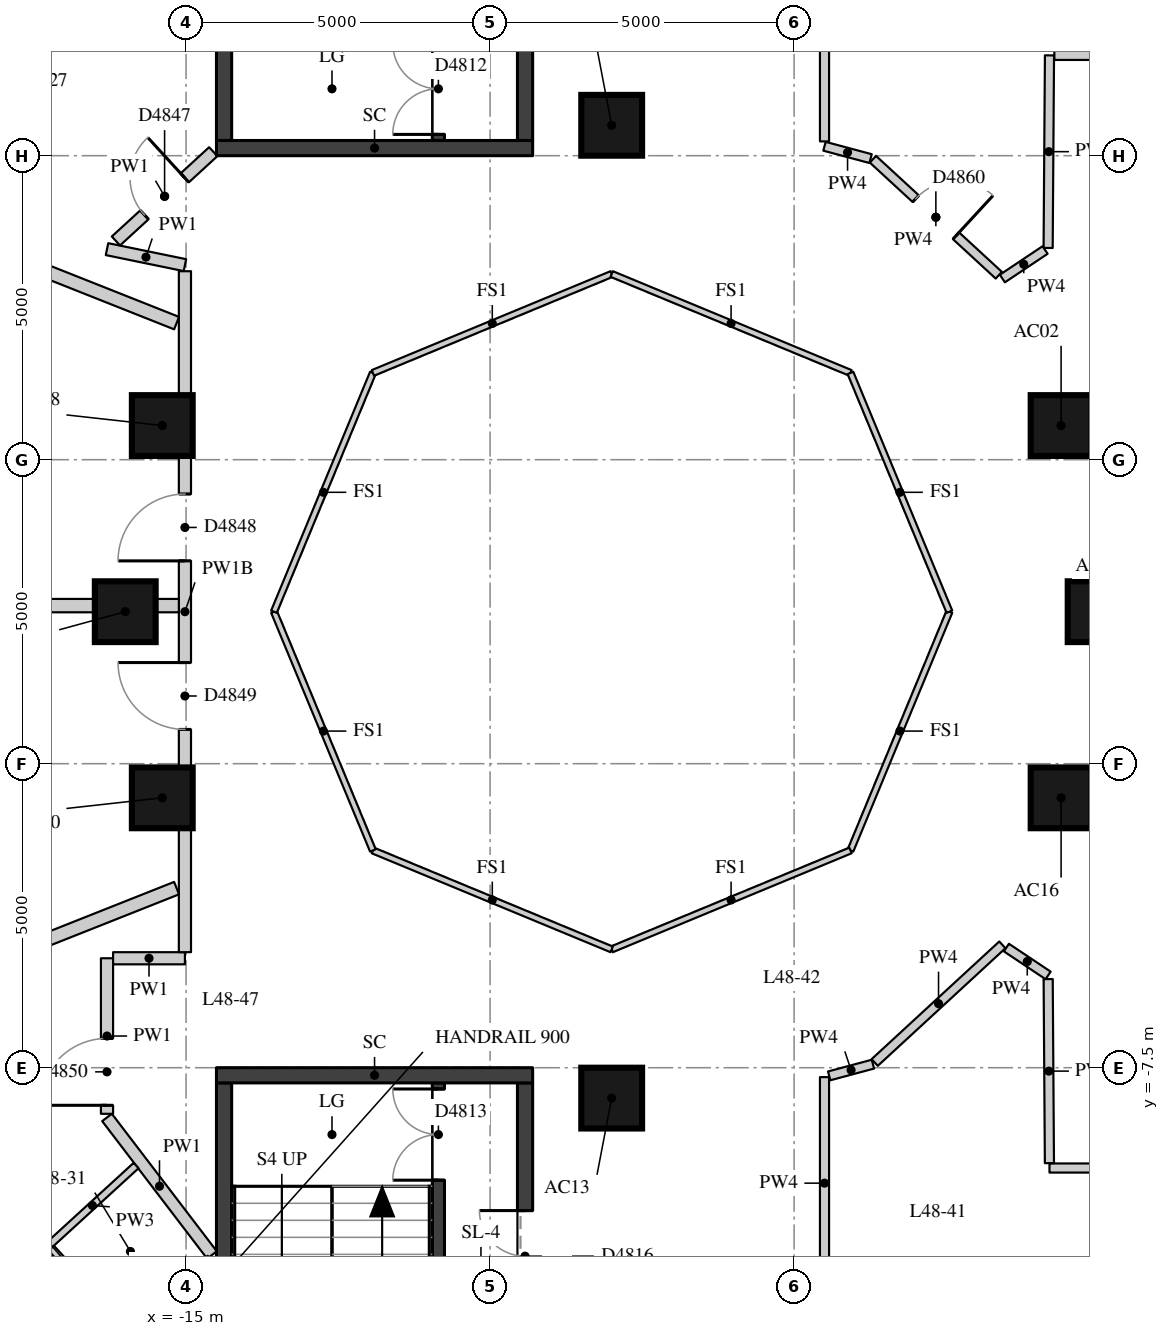
"""IFC4 building model, lengths in metres.
Left out: names, types, materials, properties, quantities, classifications, styles, units other than length and angle.
Written with IfcOpenShell. Run it as: python <this file> out.ifc"""

import sys

from ifc_helpers import new_model, si_unit, direction, frame, frame_2d, origin, origin_2d, place, context, subcontext, project, spatial, rectangle, extrude, element, fill, save


model = new_model("IFC4")
c1 = context("Model", 3, precision=1e-05, world=origin(), true_north=direction((0.0, 1.0)))
c2 = subcontext(c1, "Body", "Model", "MODEL_VIEW")
j1 = project(units=[si_unit("LENGTHUNIT", "METRE"), si_unit("PLANEANGLEUNIT", "RADIAN")], contexts=[c1])
p1 = place(None, origin())
s1 = spatial("IfcSite", under=j1, at=p1, CompositionType="ELEMENT")
p2 = place(p1, origin())
s2 = spatial("IfcBuilding", under=s1, at=p2, CompositionType="ELEMENT")
p3 = place(p2, frame((0.0, 0.0, 171.5)))
s3 = spatial("IfcBuildingStorey", under=s2, at=p3, CompositionType="ELEMENT", Elevation=171.5)
for number, where, z_axis, x_axis in (
    (1, (0.0, 0.0, 0.0), (0.0, 0.0, 1.0), (1.0, 0.0, 0.0)),
    (2, (-0.609, 3.062, 0.0), (0.0, 0.0, 1.0), (1.0, 0.0, 0.0)),
    (3, (-8.0, 8.0, 0.0), (0.0, 0.0, 1.0), (1.0, 0.0, 0.0)),
    (4, (-15.391, 3.062, 0.0), (0.0, 0.0, 1.0), (1.0, 0.0, 0.0)),
    (5, (-16.0, 0.0, 0.0), (0.0, 0.0, 1.0), (1.0, 0.0, 0.0)),
    (6, (-15.391, -3.062, 0.0), (0.0, 0.0, 1.0), (1.0, 0.0, 0.0)),
    (7, (-8.0, -8.0, 0.0), (0.0, 0.0, 1.0), (1.0, 0.0, 0.0)),
    (8, (-0.609, -3.062, 0.0), (0.0, 0.0, 1.0), (1.0, 0.0, 0.0)),
):
    element("IfcColumn", number, at=place(p3, frame(where, z_axis=z_axis, x_axis=x_axis)), inside=s3, PredefinedType="COLUMN", context=c2, shape_type="SweptSolid", body=[
        extrude(rectangle(XDim=1.0, YDim=1.0, at=origin_2d()), origin(), (0.0, 0.0, 1.0), 3.3),
    ])
p4 = place(p3, frame((-10.85, 7.75, 0.0), z_axis=(0.0, 0.0, 1.0), x_axis=(0.0, 1.0, 0.0)))
e9 = element("IfcWall", 9, at=p4, inside=s3, PredefinedType="SHEAR", context=c2, shape_type="SweptSolid", body=[
    extrude(rectangle(XDim=6.0, YDim=0.2, at=frame_2d((3.0, 0.0))), origin(), (0.0, 0.0, 1.0), 3.02),
])
p5 = place(p4, frame((0.1, 0.0, 0.0)))
e10 = element("IfcOpeningElement", 10, at=p5, cuts=e9, PredefinedType="OPENING", context=c2, shape_type="SweptSolid", body=[
    extrude(rectangle(XDim=1.5, YDim=2.1, at=frame_2d((0.75, 1.05))), frame((0.0, 0.11, 0.0), z_axis=(0.0, -1.0, 0.0), x_axis=(1.0, 0.0, 0.0)), (0.0, 0.0, 1.0), 0.22),
])
p6 = place(p3, frame((-10.85, -13.75, 0.0), z_axis=(0.0, 0.0, 1.0), x_axis=(0.0, 1.0, 0.0)))
e11 = element("IfcWall", 11, at=p6, inside=s3, PredefinedType="SHEAR", context=c2, shape_type="SweptSolid", body=[
    extrude(rectangle(XDim=6.0, YDim=0.2, at=frame_2d((3.0, 0.0))), origin(), (0.0, 0.0, 1.0), 3.02),
])
p7 = place(p6, frame((4.4, 0.0, 0.0)))
e12 = element("IfcOpeningElement", 12, at=p7, cuts=e11, PredefinedType="OPENING", context=c2, shape_type="SweptSolid", body=[
    extrude(rectangle(XDim=1.5, YDim=2.1, at=frame_2d((0.75, 1.05))), frame((0.0, 0.11, 0.0), z_axis=(0.0, -1.0, 0.0), x_axis=(1.0, 0.0, 0.0)), (0.0, 0.0, 1.0), 0.22),
])
p8 = place(p3, frame((-14.375, 7.75, -0.28), z_axis=(0.0, 0.0, 1.0), x_axis=(0.0, 1.0, 0.0)))
e13 = element("IfcWall", 13, at=p8, inside=s3, PredefinedType="SHEAR", context=c2, shape_type="SweptSolid", body=[
    extrude(rectangle(XDim=6.0, YDim=0.25, at=frame_2d((3.0, 0.0))), origin(), (0.0, 0.0, 1.0), 3.3),
])
p9 = place(p3, frame((-9.425, 7.75, -0.28), z_axis=(0.0, 0.0, 1.0), x_axis=(0.0, 1.0, 0.0)))
e14 = element("IfcWall", 14, at=p9, inside=s3, PredefinedType="SHEAR", context=c2, shape_type="SweptSolid", body=[
    extrude(rectangle(XDim=6.0, YDim=0.25, at=frame_2d((3.0, 0.0))), origin(), (0.0, 0.0, 1.0), 3.3),
])
p10 = place(p9, frame((2.1, 0.0, 0.28)))
e15 = element("IfcOpeningElement", 15, at=p10, cuts=e14, PredefinedType="OPENING", context=c2, shape_type="SweptSolid", body=[
    extrude(rectangle(XDim=1.5, YDim=2.1, at=frame_2d((0.75, 1.05))), frame((0.0, 0.135, 0.0), z_axis=(0.0, -1.0, 0.0), x_axis=(1.0, 0.0, 0.0)), (0.0, 0.0, 1.0), 0.27),
])
p11 = place(p3, frame((-14.5, 7.625, -0.28), z_axis=(0.0, 0.0, 1.0), x_axis=(1.0, 0.0, 0.0)))
e16 = element("IfcWall", 16, at=p11, inside=s3, PredefinedType="SHEAR", context=c2, shape_type="SweptSolid", body=[
    extrude(rectangle(XDim=5.2, YDim=0.25, at=frame_2d((2.6, 0.0))), origin(), (0.0, 0.0, 1.0), 3.3),
])
p12 = place(p3, frame((-14.375, -13.75, -0.28), z_axis=(0.0, 0.0, 1.0), x_axis=(0.0, 1.0, 0.0)))
e17 = element("IfcWall", 17, at=p12, inside=s3, PredefinedType="SHEAR", context=c2, shape_type="SweptSolid", body=[
    extrude(rectangle(XDim=6.0, YDim=0.25, at=frame_2d((3.0, 0.0))), origin(), (0.0, 0.0, 1.0), 3.3),
])
p13 = place(p3, frame((-9.425, -13.75, -0.28), z_axis=(0.0, 0.0, 1.0), x_axis=(0.0, 1.0, 0.0)))
e18 = element("IfcWall", 18, at=p13, inside=s3, PredefinedType="SHEAR", context=c2, shape_type="SweptSolid", body=[
    extrude(rectangle(XDim=6.0, YDim=0.25, at=frame_2d((3.0, 0.0))), origin(), (0.0, 0.0, 1.0), 3.3),
])
p14 = place(p13, frame((2.4, 0.0, 0.28)))
e19 = element("IfcOpeningElement", 19, at=p14, cuts=e18, PredefinedType="OPENING", context=c2, shape_type="SweptSolid", body=[
    extrude(rectangle(XDim=1.5, YDim=2.1, at=frame_2d((0.75, 1.05))), frame((0.0, 0.135, 0.0), z_axis=(0.0, -1.0, 0.0), x_axis=(1.0, 0.0, 0.0)), (0.0, 0.0, 1.0), 0.27),
])
p15 = place(p3, frame((-14.5, -7.625, -0.28), z_axis=(0.0, 0.0, 1.0), x_axis=(1.0, 0.0, 0.0)))
e20 = element("IfcWall", 20, at=p15, inside=s3, PredefinedType="SHEAR", context=c2, shape_type="SweptSolid", body=[
    extrude(rectangle(XDim=5.2, YDim=0.25, at=frame_2d((2.6, 0.0))), origin(), (0.0, 0.0, 1.0), 3.3),
])
p16 = place(p3, frame((-15.019, 5.7, 0.0), z_axis=(0.0, 0.0, 1.0), x_axis=(-0.979555577822, 0.201173730785, 0.0)))
e21 = element("IfcWall", 21, at=p16, inside=s3, PredefinedType="PARTITIONING", context=c2, shape_type="SweptSolid", body=[
    extrude(rectangle(XDim=1.308, YDim=0.2, at=frame_2d((0.654, 0.0))), origin(), (0.0, 0.0, 1.0), 3.02),
])
p17 = place(p3, frame((-16.154, 6.097, 0.0), z_axis=(0.0, 0.0, 1.0), x_axis=(0.736958194284, 0.675938325498, 0.0)))
e22 = element("IfcWall", 22, at=p17, inside=s3, PredefinedType="PARTITIONING", context=c2, shape_type="SweptSolid", body=[
    extrude(rectangle(XDim=2.173, YDim=0.2, at=frame_2d((1.086, 0.0))), origin(), (0.0, 0.0, 1.0), 3.02),
])
p18 = place(p17, frame((0.636, 0.0, 0.0)))
e23 = element("IfcOpeningElement", 23, at=p18, cuts=e22, PredefinedType="OPENING", context=c2, shape_type="SweptSolid", body=[
    extrude(rectangle(XDim=0.9, YDim=2.1, at=frame_2d((0.45, 1.05))), frame((0.0, 0.11, 0.0), z_axis=(0.0, -1.0, 0.0), x_axis=(1.0, 0.0, 0.0)), (0.0, 0.0, 1.0), 0.22),
])
p19 = place(p3, frame((-14.574, -10.58, 0.0), z_axis=(0.0, 0.0, 1.0), x_axis=(-0.606733250298, 0.794905505694, 0.0)))
e24 = element("IfcWall", 24, at=p19, inside=s3, PredefinedType="PARTITIONING", context=c2, shape_type="SweptSolid", body=[
    extrude(rectangle(XDim=2.845, YDim=0.2, at=frame_2d((1.423, 0.0))), origin(), (0.0, 0.0, 1.0), 3.02),
])
p20 = place(p3, frame((-16.3, -8.258, 0.0), z_axis=(0.0, 0.0, 1.0), x_axis=(0.0, 1.0, 0.0)))
e25 = element("IfcWall", 25, at=p20, inside=s3, PredefinedType="PARTITIONING", context=c2, shape_type="SweptSolid", body=[
    extrude(rectangle(XDim=2.558, YDim=0.2, at=frame_2d((1.279, 0.0))), origin(), (0.0, 0.0, 1.0), 3.02),
])
p21 = place(p20, frame((0.14, 0.0, 0.0)))
e26 = element("IfcOpeningElement", 26, at=p21, cuts=e25, PredefinedType="OPENING", context=c2, shape_type="SweptSolid", body=[
    extrude(rectangle(XDim=1.1, YDim=2.1, at=frame_2d((0.55, 1.05))), frame((0.0, 0.11, 0.0), z_axis=(0.0, -1.0, 0.0), x_axis=(1.0, 0.0, 0.0)), (0.0, 0.0, 1.0), 0.22),
])
p22 = place(p3, frame((-16.2, -5.7, 0.0), z_axis=(0.0, 0.0, 1.0), x_axis=(1.0, 0.0, 0.0)))
e27 = element("IfcWall", 27, at=p22, inside=s3, PredefinedType="PARTITIONING", context=c2, shape_type="SweptSolid", body=[
    extrude(rectangle(XDim=1.181, YDim=0.2, at=frame_2d((0.591, 0.0))), origin(), (0.0, 0.0, 1.0), 3.02),
])
p23 = place(p3, frame((-15.019, -5.6, 0.0), z_axis=(0.0, 0.0, 1.0), x_axis=(0.0, 1.0, 0.0)))
e28 = element("IfcWall", 28, at=p23, inside=s3, PredefinedType="PARTITIONING", context=c2, shape_type="SweptSolid", body=[
    extrude(rectangle(XDim=11.2, YDim=0.2, at=frame_2d((5.6, 0.0))), origin(), (0.0, 0.0, 1.0), 2.52),
])
p24 = place(p23, frame((6.436, 0.0, 0.0)))
e29 = element("IfcOpeningElement", 29, at=p24, cuts=e28, PredefinedType="OPENING", context=c2, shape_type="SweptSolid", body=[
    extrude(rectangle(XDim=1.1, YDim=2.1, at=frame_2d((0.55, 1.05))), frame((0.0, 0.11, 0.0), z_axis=(0.0, -1.0, 0.0), x_axis=(1.0, 0.0, 0.0)), (0.0, 0.0, 1.0), 0.22),
])
p25 = place(p23, frame((3.663, 0.0, 0.0)))
e30 = element("IfcOpeningElement", 30, at=p25, cuts=e28, PredefinedType="OPENING", context=c2, shape_type="SweptSolid", body=[
    extrude(rectangle(XDim=1.1, YDim=2.1, at=frame_2d((0.55, 1.05))), frame((0.0, 0.11, 0.0), z_axis=(0.0, -1.0, 0.0), x_axis=(1.0, 0.0, 0.0)), (0.0, 0.0, 1.0), 0.22),
])
p26 = place(p3, frame((-0.8, 9.15, 0.0), z_axis=(0.0, 0.0, 1.0), x_axis=(-0.007013855529, -0.999975402613, 0.0)))
e31 = element("IfcWall", 31, at=p26, inside=s3, PredefinedType="PARTITIONING", context=c2, shape_type="SweptSolid", body=[
    extrude(rectangle(XDim=3.167, YDim=0.15, at=frame_2d((1.584, 0.0))), origin(), (0.0, 0.0, 1.0), 3.02),
])
p27 = place(p3, frame((-0.872, 5.949, 0.0), z_axis=(0.0, 0.0, 1.0), x_axis=(-0.831694574928, -0.555233405006, 0.0)))
e32 = element("IfcWall", 32, at=p27, inside=s3, PredefinedType="PARTITIONING", context=c2, shape_type="SweptSolid", body=[
    extrude(rectangle(XDim=0.845, YDim=0.15, at=frame_2d((0.423, 0.0))), origin(), (0.0, 0.0, 1.0), 3.02),
])
p28 = place(p3, frame((-1.634, 5.534, 0.0), z_axis=(0.0, 0.0, 1.0), x_axis=(-0.735398368623, 0.67763503409, 0.0)))
e33 = element("IfcWall", 33, at=p28, inside=s3, PredefinedType="PARTITIONING", context=c2, shape_type="SweptSolid", body=[
    extrude(rectangle(XDim=2.815, YDim=0.15, at=frame_2d((1.407, 0.0))), origin(), (0.0, 0.0, 1.0), 3.02),
])
p29 = place(p28, frame((0.958, 0.0, 0.0)))
e34 = element("IfcOpeningElement", 34, at=p29, cuts=e33, PredefinedType="OPENING", context=c2, shape_type="SweptSolid", body=[
    extrude(rectangle(XDim=0.9, YDim=2.1, at=frame_2d((0.45, 1.05))), frame((0.0, 0.085, 0.0), z_axis=(0.0, -1.0, 0.0), x_axis=(1.0, 0.0, 0.0)), (0.0, 0.0, 1.0), 0.17),
])
p30 = place(p3, frame((-3.742, 7.452, 0.0), z_axis=(0.0, 0.0, 1.0), x_axis=(-0.965903596155, 0.258901994846, 0.0)))
e35 = element("IfcWall", 35, at=p30, inside=s3, PredefinedType="PARTITIONING", context=c2, shape_type="SweptSolid", body=[
    extrude(rectangle(XDim=0.785, YDim=0.15, at=frame_2d((0.392, 0.0))), origin(), (0.0, 0.0, 1.0), 3.02),
])
p31 = place(p3, frame((-4.5, 7.735, 0.0), z_axis=(0.0, 0.0, 1.0), x_axis=(0.0, 1.0, 0.0)))
e36 = element("IfcWall", 36, at=p31, inside=s3, PredefinedType="PARTITIONING", context=c2, shape_type="SweptSolid", body=[
    extrude(rectangle(XDim=3.848, YDim=0.15, at=frame_2d((1.924, 0.0))), origin(), (0.0, 0.0, 1.0), 3.02),
])
p32 = place(p3, frame((1.32, 9.15, 0.0), z_axis=(0.0, 0.0, 1.0), x_axis=(-1.0, 0.0, 0.0)))
e37 = element("IfcWall", 37, at=p32, inside=s3, PredefinedType="PARTITIONING", context=c2, shape_type="SweptSolid", body=[
    extrude(rectangle(XDim=2.04, YDim=0.15, at=frame_2d((1.02, 0.0))), origin(), (0.0, 0.0, 1.0), 3.02),
])
p33 = place(p3, frame((-0.8, -9.15, 0.0), z_axis=(0.0, 0.0, 1.0), x_axis=(1.0, 0.0, 0.0)))
e38 = element("IfcWall", 38, at=p33, inside=s3, PredefinedType="PARTITIONING", context=c2, shape_type="SweptSolid", body=[
    extrude(rectangle(XDim=2.2, YDim=0.15, at=frame_2d((1.1, 0.0))), origin(), (0.0, 0.0, 1.0), 3.02),
])
p34 = place(p3, frame((-4.5, -11.143, 0.0), z_axis=(0.0, 0.0, 1.0), x_axis=(0.0, 1.0, 0.0)))
e39 = element("IfcWall", 39, at=p34, inside=s3, PredefinedType="PARTITIONING", context=c2, shape_type="SweptSolid", body=[
    extrude(rectangle(XDim=3.488, YDim=0.15, at=frame_2d((1.744, 0.0))), origin(), (0.0, 0.0, 1.0), 3.02),
])
p35 = place(p3, frame((-4.423, -7.635, 0.0), z_axis=(0.0, 0.0, 1.0), x_axis=(0.965874851679, 0.259009210056, 0.0)))
e40 = element("IfcWall", 40, at=p35, inside=s3, PredefinedType="PARTITIONING", context=c2, shape_type="SweptSolid", body=[
    extrude(rectangle(XDim=0.745, YDim=0.15, at=frame_2d((0.372, 0.0))), origin(), (0.0, 0.0, 1.0), 3.02),
])
p36 = place(p3, frame((-3.674, -7.414, 0.0), z_axis=(0.0, 0.0, 1.0), x_axis=(0.735337612747, 0.677700963021, 0.0)))
e41 = element("IfcWall", 41, at=p36, inside=s3, PredefinedType="PARTITIONING", context=c2, shape_type="SweptSolid", body=[
    extrude(rectangle(XDim=2.855, YDim=0.15, at=frame_2d((1.427, 0.0))), origin(), (0.0, 0.0, 1.0), 3.02),
])
p37 = place(p3, frame((-1.509, -5.524, 0.0), z_axis=(0.0, 0.0, 1.0), x_axis=(0.831777054297, -0.555109837731, 0.0)))
e42 = element("IfcWall", 42, at=p37, inside=s3, PredefinedType="PARTITIONING", context=c2, shape_type="SweptSolid", body=[
    extrude(rectangle(XDim=0.825, YDim=0.15, at=frame_2d((0.413, 0.0))), origin(), (0.0, 0.0, 1.0), 3.02),
])
p38 = place(p3, frame((-0.822, -6.042, 0.0), z_axis=(0.0, 0.0, 1.0), x_axis=(0.006774038121, -0.999977055941, 0.0)))
e43 = element("IfcWall", 43, at=p38, inside=s3, PredefinedType="PARTITIONING", context=c2, shape_type="SweptSolid", body=[
    extrude(rectangle(XDim=3.027, YDim=0.15, at=frame_2d((1.514, 0.0))), origin(), (0.0, 0.0, 1.0), 3.02),
])
p39 = place(p3, frame((-21.239, 7.16, 0.0), z_axis=(0.0, 0.0, 1.0), x_axis=(0.929520145478, -0.368771337215, 0.0)))
e44 = element("IfcWall", 44, at=p39, inside=s3, PredefinedType="PARTITIONING", context=c2, shape_type="SweptSolid", body=[
    extrude(rectangle(XDim=6.544, YDim=0.22, at=frame_2d((3.272, 0.0))), origin(), (0.0, 0.0, 1.0), 3.02),
])
p40 = place(p3, frame((-22.6, 0.1, 0.0), z_axis=(0.0, 0.0, 1.0), x_axis=(1.0, 0.0, 0.0)))
e45 = element("IfcWall", 45, at=p40, inside=s3, PredefinedType="PARTITIONING", context=c2, shape_type="SweptSolid", body=[
    extrude(rectangle(XDim=7.481, YDim=0.22, at=frame_2d((3.741, 0.0))), origin(), (0.0, 0.0, 1.0), 2.57),
])
p41 = place(p3, frame((-21.239, -6.96, 0.0), z_axis=(0.0, 0.0, 1.0), x_axis=(0.929520145478, 0.368771337215, 0.0)))
e46 = element("IfcWall", 46, at=p41, inside=s3, PredefinedType="PARTITIONING", context=c2, shape_type="SweptSolid", body=[
    extrude(rectangle(XDim=6.544, YDim=0.22, at=frame_2d((3.272, 0.0))), origin(), (0.0, 0.0, 1.0), 3.02),
])
p42 = place(p3, frame((-17.31, -13.182, 0.0), z_axis=(0.0, 0.0, 1.0), x_axis=(0.737860436015, 0.674953314655, 0.0)))
e47 = element("IfcWall", 47, at=p42, inside=s3, PredefinedType="PARTITIONING", context=c2, shape_type="SweptSolid", body=[
    extrude(rectangle(XDim=3.714, YDim=0.22, at=frame_2d((1.857, 0.0))), origin(), (0.0, 0.0, 1.0), 3.02),
])
p43 = place(p3, frame((-15.822, -9.11, 0.0), z_axis=(0.0, 0.0, 1.0), x_axis=(-0.737882479632, -0.674929215734, 0.0)))
e48 = element("IfcWall", 48, at=p43, inside=s3, PredefinedType="PARTITIONING", context=c2, shape_type="SweptSolid", body=[
    extrude(rectangle(XDim=1.947, YDim=0.12, at=frame_2d((0.973, 0.0))), origin(), (0.0, 0.0, 1.0), 3.02),
])
p44 = place(p3, frame((-17.218, -10.468, 0.0), z_axis=(0.0, 0.0, 1.0), x_axis=(0.674920747044, -0.737890225717, 0.0)))
e49 = element("IfcWall", 49, at=p44, inside=s3, PredefinedType="PARTITIONING", context=c2, shape_type="SweptSolid", body=[
    extrude(rectangle(XDim=1.83, YDim=0.12, at=frame_2d((0.915, 0.0))), origin(), (0.0, 0.0, 1.0), 3.02),
])
p45 = place(p44, frame((0.54, 0.0, 0.0)))
e50 = element("IfcOpeningElement", 50, at=p45, cuts=e49, PredefinedType="OPENING", context=c2, shape_type="SweptSolid", body=[
    extrude(rectangle(XDim=0.8, YDim=2.1, at=frame_2d((0.4, 1.05))), frame((0.0, 0.07, 0.0), z_axis=(0.0, -1.0, 0.0), x_axis=(1.0, 0.0, 0.0)), (0.0, 0.0, 1.0), 0.14),
])
for number, where, z_axis, x_axis in (
    (51, (-2.446, 0.0, 0.0), (0.0, 0.0, 1.0), (-0.383, -0.924, 0.0)),
    (52, (-4.073, -3.927, 0.0), (0.0, 0.0, 1.0), (-0.924, -0.383, 0.0)),
    (53, (-8.0, -5.554, 0.0), (0.0, 0.0, 1.0), (-0.924, 0.383, 0.0)),
    (54, (-11.927, -3.927, 0.0), (0.0, 0.0, 1.0), (-0.383, 0.924, 0.0)),
    (55, (-13.554, 0.0, 0.0), (0.0, 0.0, 1.0), (0.383, 0.924, 0.0)),
    (56, (-11.927, 3.927, 0.0), (0.0, 0.0, 1.0), (0.924, 0.383, 0.0)),
    (57, (-8.0, 5.554, 0.0), (0.0, 0.0, 1.0), (0.924, -0.383, 0.0)),
    (58, (-4.073, 3.927, 0.0), (0.0, 0.0, 1.0), (0.383, -0.924, 0.0)),
):
    element("IfcWall", number, at=place(p3, frame(where, z_axis=z_axis, x_axis=x_axis)), inside=s3, PredefinedType="PARTITIONING", context=c2, shape_type="SweptSolid", body=[
        extrude(rectangle(XDim=4.251, YDim=0.1, at=frame_2d((2.125, 0.0))), origin(), (0.0, 0.0, 1.0), 3.02),
    ])
p46 = place(p5, origin())
e59 = element("IfcDoor", 59, at=p46, inside=s3, OperationType="DOUBLE_DOOR_SINGLE_SWING", PredefinedType="DOOR", context=c2, shape_type="SweptSolid", body=[
    extrude(rectangle(XDim=1.5, YDim=2.1, at=frame_2d((0.75, 1.05))), frame((0.0, 0.025, 0.0), z_axis=(0.0, -1.0, 0.0), x_axis=(1.0, 0.0, 0.0)), (0.0, 0.0, 1.0), 0.05),
])
fill(e10, e59)
p47 = place(p7, origin())
e60 = element("IfcDoor", 60, at=p47, inside=s3, OperationType="DOUBLE_DOOR_SINGLE_SWING", PredefinedType="DOOR", context=c2, shape_type="SweptSolid", body=[
    extrude(rectangle(XDim=1.5, YDim=2.1, at=frame_2d((0.75, 1.05))), frame((0.0, 0.025, 0.0), z_axis=(0.0, -1.0, 0.0), x_axis=(1.0, 0.0, 0.0)), (0.0, 0.0, 1.0), 0.05),
])
fill(e12, e60)
p48 = place(p14, origin())
e61 = element("IfcDoor", 61, at=p48, inside=s3, OperationType="DOUBLE_DOOR_SINGLE_SWING", PredefinedType="DOOR", context=c2, shape_type="SweptSolid", body=[
    extrude(rectangle(XDim=1.5, YDim=2.1, at=frame_2d((0.75, 1.05))), frame((0.0, 0.025, 0.0), z_axis=(0.0, -1.0, 0.0), x_axis=(1.0, 0.0, 0.0)), (0.0, 0.0, 1.0), 0.05),
])
fill(e19, e61)
p49 = place(p18, origin())
e62 = element("IfcDoor", 62, at=p49, inside=s3, OperationType="SINGLE_SWING_RIGHT", PredefinedType="DOOR", context=c2, shape_type="SweptSolid", body=[
    extrude(rectangle(XDim=0.9, YDim=2.1, at=frame_2d((0.45, 1.05))), frame((0.0, 0.025, 0.0), z_axis=(0.0, -1.0, 0.0), x_axis=(1.0, 0.0, 0.0)), (0.0, 0.0, 1.0), 0.05),
])
fill(e23, e62)
p50 = place(p24, origin())
e63 = element("IfcDoor", 63, at=p50, inside=s3, OperationType="SINGLE_SWING_LEFT", PredefinedType="DOOR", context=c2, shape_type="SweptSolid", body=[
    extrude(rectangle(XDim=1.1, YDim=2.1, at=frame_2d((0.55, 1.05))), frame((0.0, 0.025, 0.0), z_axis=(0.0, -1.0, 0.0), x_axis=(1.0, 0.0, 0.0)), (0.0, 0.0, 1.0), 0.05),
])
fill(e29, e63)
p51 = place(p25, origin())
e64 = element("IfcDoor", 64, at=p51, inside=s3, OperationType="SINGLE_SWING_RIGHT", PredefinedType="DOOR", context=c2, shape_type="SweptSolid", body=[
    extrude(rectangle(XDim=1.1, YDim=2.1, at=frame_2d((0.55, 1.05))), frame((0.0, 0.025, 0.0), z_axis=(0.0, -1.0, 0.0), x_axis=(1.0, 0.0, 0.0)), (0.0, 0.0, 1.0), 0.05),
])
fill(e30, e64)
p52 = place(p21, origin())
e65 = element("IfcDoor", 65, at=p52, inside=s3, OperationType="SINGLE_SWING_LEFT", PredefinedType="DOOR", context=c2, shape_type="SweptSolid", body=[
    extrude(rectangle(XDim=1.1, YDim=2.1, at=frame_2d((0.55, 1.05))), frame((0.0, 0.025, 0.0), z_axis=(0.0, -1.0, 0.0), x_axis=(1.0, 0.0, 0.0)), (0.0, 0.0, 1.0), 0.05),
])
fill(e26, e65)
p53 = place(p29, origin())
e66 = element("IfcDoor", 66, at=p53, inside=s3, OperationType="SINGLE_SWING_RIGHT", PredefinedType="DOOR", context=c2, shape_type="SweptSolid", body=[
    extrude(rectangle(XDim=0.9, YDim=2.1, at=frame_2d((0.45, 1.05))), frame((0.0, 0.025, 0.0), z_axis=(0.0, -1.0, 0.0), x_axis=(1.0, 0.0, 0.0)), (0.0, 0.0, 1.0), 0.05),
])
fill(e34, e66)
save(model, sys.argv[1])
